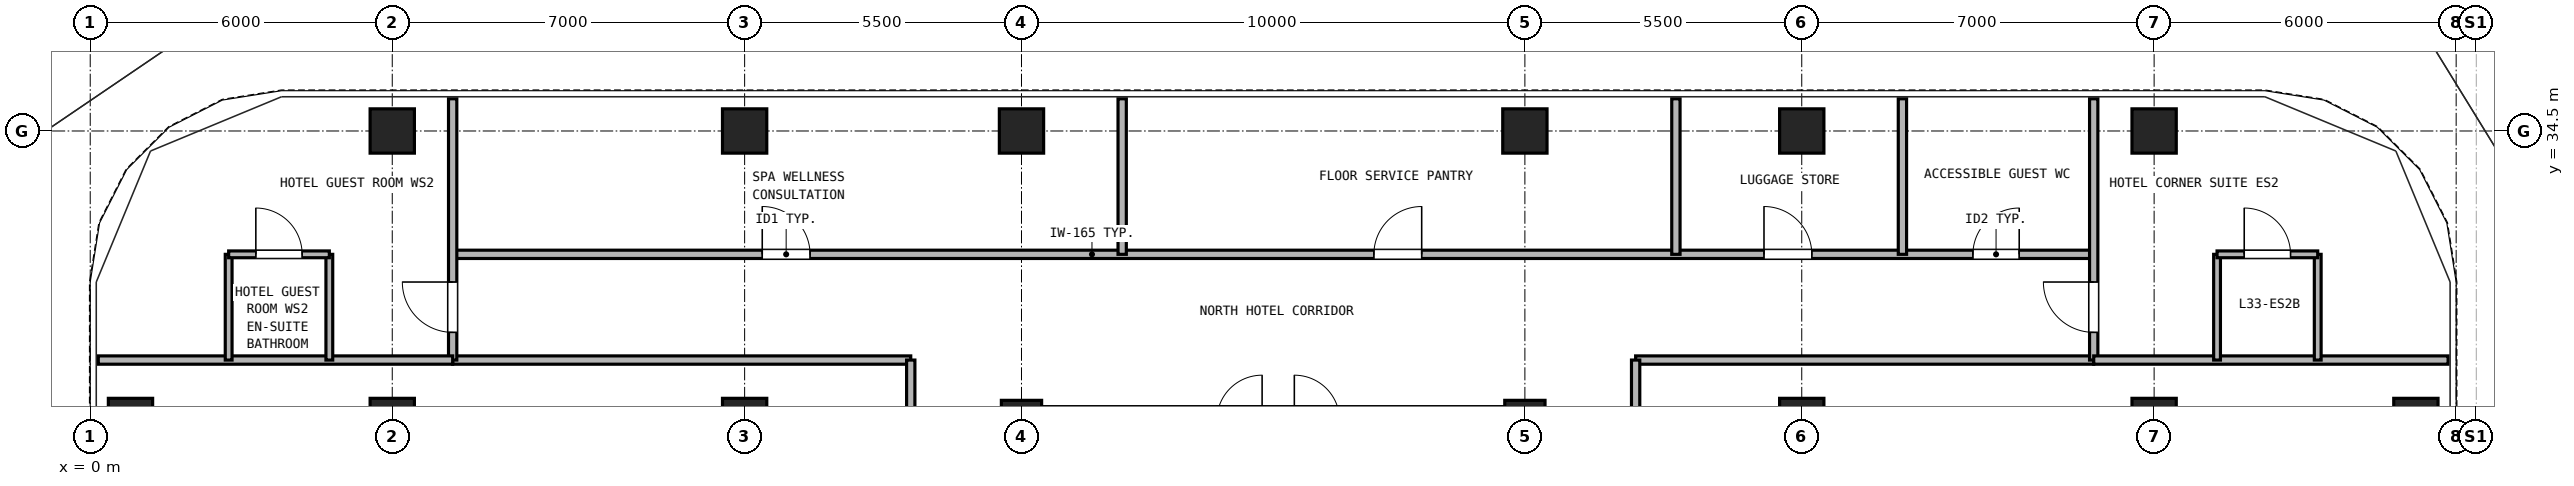
"""IFC4 building model, lengths in metres.
Left out: names, types, materials, properties, quantities, classifications, styles, units other than length and angle.
Written with IfcOpenShell. Run it as: python <this file> out.ifc"""

import sys

from ifc_helpers import new_model, si_unit, direction, frame, frame_2d, origin, origin_2d, place, context, subcontext, project, spatial, rectangle, hollow_rectangle, extrude, source, transform, mapped, element, fill, save


model = new_model("IFC4")
c1 = context("Model", 3, precision=1e-05, world=origin(), true_north=direction((0.0, 1.0)))
c2 = subcontext(c1, "Body", "Model", "MODEL_VIEW")
j1 = project(units=[si_unit("LENGTHUNIT", "METRE"), si_unit("PLANEANGLEUNIT", "RADIAN")], contexts=[c1])
p1 = place(None, origin())
s1 = spatial("IfcSite", under=j1, at=p1, CompositionType="ELEMENT")
p2 = place(p1, origin())
s2 = spatial("IfcBuilding", under=s1, at=p2, CompositionType="ELEMENT")
p3 = place(p2, frame((0.0, 0.0, 121.5)))
s3 = spatial("IfcBuildingStorey", under=s2, at=p3, CompositionType="ELEMENT", Elevation=121.5)
m1 = source(origin(), c2, "Body", "SweptSolid", [
    extrude(hollow_rectangle(XDim=0.88, YDim=0.88, WallThickness=0.05, at=origin_2d()), origin(), (0.0, 0.0, 1.0), 2.95),
])
for number, where, z_axis, x_axis in (
    (1, (6.0, 34.5, 0.0), (0.0, 0.0, 1.0), (1.0, 0.0, 0.0)),
    (2, (13.0, 34.5, 0.0), (0.0, 0.0, 1.0), (1.0, 0.0, 0.0)),
    (3, (18.5, 34.5, 0.0), (0.0, 0.0, 1.0), (1.0, 0.0, 0.0)),
    (4, (28.5, 34.5, 0.0), (0.0, 0.0, 1.0), (1.0, 0.0, 0.0)),
    (5, (34.0, 34.5, 0.0), (0.0, 0.0, 1.0), (1.0, 0.0, 0.0)),
    (6, (41.0, 34.5, 0.0), (0.0, 0.0, 1.0), (1.0, 0.0, 0.0)),
    (7, (0.8, 28.75, 0.0), (0.0, 0.0, 1.0), (1.0, 0.0, 0.0)),
    (8, (46.2, 28.75, 0.0), (0.0, 0.0, 1.0), (1.0, 0.0, 0.0)),
    (9, (6.0, 28.75, 0.0), (0.0, 0.0, 1.0), (1.0, 0.0, 0.0)),
    (10, (13.0, 28.75, 0.0), (0.0, 0.0, 1.0), (1.0, 0.0, 0.0)),
):
    element("IfcColumn", number, at=place(p3, frame(where, z_axis=z_axis, x_axis=x_axis)), inside=s3, PredefinedType="COLUMN", context=c2, shape_type="MappedRepresentation", body=[
        mapped(m1, transform((0.0, 0.0, 0.0), x_axis=(1.0, 0.0, 0.0), y_axis=(0.0, 1.0, 0.0), z_axis=(0.0, 0.0, 1.0), scale=1.0)),
    ])
m2 = source(origin(), c2, "Body", "SweptSolid", [
    extrude(hollow_rectangle(XDim=0.8, YDim=0.8, WallThickness=0.045, at=origin_2d()), origin(), (0.0, 0.0, 1.0), 2.95),
])
for number, where, z_axis, x_axis in (
    (11, (18.5, 28.75, 0.0), (0.0, 0.0, 1.0), (1.0, 0.0, 0.0)),
    (12, (28.5, 28.75, 0.0), (0.0, 0.0, 1.0), (1.0, 0.0, 0.0)),
):
    element("IfcColumn", number, at=place(p3, frame(where, z_axis=z_axis, x_axis=x_axis)), inside=s3, PredefinedType="COLUMN", context=c2, shape_type="MappedRepresentation", body=[
        mapped(m2, transform((0.0, 0.0, 0.0), x_axis=(1.0, 0.0, 0.0), y_axis=(0.0, 1.0, 0.0), z_axis=(0.0, 0.0, 1.0), scale=1.0)),
    ])
for number, where, z_axis, x_axis in (
    (13, (34.0, 28.75, 0.0), (0.0, 0.0, 1.0), (1.0, 0.0, 0.0)),
    (14, (41.0, 28.75, 0.0), (0.0, 0.0, 1.0), (1.0, 0.0, 0.0)),
):
    element("IfcColumn", number, at=place(p3, frame(where, z_axis=z_axis, x_axis=x_axis)), inside=s3, PredefinedType="COLUMN", context=c2, shape_type="MappedRepresentation", body=[
        mapped(m1, transform((0.0, 0.0, 0.0), x_axis=(1.0, 0.0, 0.0), y_axis=(0.0, 1.0, 0.0), z_axis=(0.0, 0.0, 1.0), scale=1.0)),
    ])
p4 = place(p3, frame((7.2, 32.05, 0.0), z_axis=(0.0, 0.0, 1.0), x_axis=(1.0, 0.0, 0.0)))
e15 = element("IfcWall", 15, at=p4, inside=s3, PredefinedType="PARTITIONING", context=c2, shape_type="SweptSolid", body=[
    extrude(rectangle(XDim=32.6, YDim=0.165, at=frame_2d((16.3, 0.0))), origin(), (0.0, 0.0, 1.0), 2.95),
])
p5 = place(p4, frame((6.15, 0.0, 0.0)))
e16 = element("IfcOpeningElement", 16, at=p5, cuts=e15, PredefinedType="OPENING", context=c2, shape_type="SweptSolid", body=[
    extrude(rectangle(XDim=0.95, YDim=2.15, at=frame_2d((0.475, 1.075))), frame((0.0, 0.093, 0.0), z_axis=(0.0, -1.0, 0.0), x_axis=(1.0, 0.0, 0.0)), (0.0, 0.0, 1.0), 0.185),
])
p6 = place(p4, frame((18.3, 0.0, 0.0)))
e17 = element("IfcOpeningElement", 17, at=p6, cuts=e15, PredefinedType="OPENING", context=c2, shape_type="SweptSolid", body=[
    extrude(rectangle(XDim=0.95, YDim=2.15, at=frame_2d((0.475, 1.075))), frame((0.0, 0.093, 0.0), z_axis=(0.0, -1.0, 0.0), x_axis=(1.0, 0.0, 0.0)), (0.0, 0.0, 1.0), 0.185),
])
p7 = place(p4, frame((26.05, 0.0, 0.0)))
e18 = element("IfcOpeningElement", 18, at=p7, cuts=e15, PredefinedType="OPENING", context=c2, shape_type="SweptSolid", body=[
    extrude(rectangle(XDim=0.95, YDim=2.15, at=frame_2d((0.475, 1.075))), frame((0.0, 0.093, 0.0), z_axis=(0.0, -1.0, 0.0), x_axis=(1.0, 0.0, 0.0)), (0.0, 0.0, 1.0), 0.185),
])
p8 = place(p4, frame((30.2, 0.0, 0.0)))
e19 = element("IfcOpeningElement", 19, at=p8, cuts=e15, PredefinedType="OPENING", context=c2, shape_type="SweptSolid", body=[
    extrude(rectangle(XDim=0.92, YDim=2.1, at=frame_2d((0.46, 1.05))), frame((0.0, 0.093, 0.0), z_axis=(0.0, -1.0, 0.0), x_axis=(1.0, 0.0, 0.0)), (0.0, 0.0, 1.0), 0.185),
])
for number, where, z_axis, x_axis in (
    (20, (7.2, 29.95, 0.0), (0.0, 0.0, 1.0), (1.0, 0.0, 0.0)),
    (21, (30.7, 29.95, 0.0), (0.0, 0.0, 1.0), (1.0, 0.0, 0.0)),
):
    element("IfcWall", number, at=place(p3, frame(where, z_axis=z_axis, x_axis=x_axis)), inside=s3, PredefinedType="PARTITIONING", context=c2, shape_type="SweptSolid", body=[
        extrude(rectangle(XDim=9.1, YDim=0.165, at=frame_2d((4.55, 0.0))), origin(), (0.0, 0.0, 1.0), 2.95),
    ])
p9 = place(p3, frame((16.3, 11.2, 0.0), z_axis=(0.0, 0.0, 1.0), x_axis=(0.0, 1.0, 0.0)))
e22 = element("IfcWall", 22, at=p9, inside=s3, PredefinedType="PARTITIONING", context=c2, shape_type="SweptSolid", body=[
    extrude(rectangle(XDim=18.75, YDim=0.165, at=frame_2d((9.375, 0.0))), origin(), (0.0, 0.0, 1.0), 2.95),
])
p10 = place(p9, frame((8.875, 0.0, 0.0)))
e23 = element("IfcOpeningElement", 23, at=p10, cuts=e22, PredefinedType="OPENING", context=c2, shape_type="SweptSolid", body=[
    extrude(rectangle(XDim=0.95, YDim=2.15, at=frame_2d((0.475, 1.075))), frame((0.0, 0.093, 0.0), z_axis=(0.0, -1.0, 0.0), x_axis=(1.0, 0.0, 0.0)), (0.0, 0.0, 1.0), 0.185),
])
p11 = place(p3, frame((30.7, 11.2, 0.0), z_axis=(0.0, 0.0, 1.0), x_axis=(0.0, 1.0, 0.0)))
e24 = element("IfcWall", 24, at=p11, inside=s3, PredefinedType="PARTITIONING", context=c2, shape_type="SweptSolid", body=[
    extrude(rectangle(XDim=18.75, YDim=0.165, at=frame_2d((9.375, 0.0))), origin(), (0.0, 0.0, 1.0), 2.95),
])
p12 = place(p11, frame((2.6, 0.0, 0.0)))
e25 = element("IfcOpeningElement", 25, at=p12, cuts=e24, PredefinedType="OPENING", context=c2, shape_type="SweptSolid", body=[
    extrude(rectangle(XDim=0.95, YDim=2.15, at=frame_2d((0.475, 1.075))), frame((0.0, 0.093, 0.0), z_axis=(0.0, -1.0, 0.0), x_axis=(1.0, 0.0, 0.0)), (0.0, 0.0, 1.0), 0.185),
])
p13 = place(p11, frame((8.8, 0.0, 0.0)))
e26 = element("IfcOpeningElement", 26, at=p13, cuts=e24, PredefinedType="OPENING", context=c2, shape_type="SweptSolid", body=[
    extrude(rectangle(XDim=0.95, YDim=2.15, at=frame_2d((0.475, 1.075))), frame((0.0, 0.093, 0.0), z_axis=(0.0, -1.0, 0.0), x_axis=(1.0, 0.0, 0.0)), (0.0, 0.0, 1.0), 0.185),
])
p14 = place(p11, frame((15.075, 0.0, 0.0)))
e27 = element("IfcOpeningElement", 27, at=p14, cuts=e24, PredefinedType="OPENING", context=c2, shape_type="SweptSolid", body=[
    extrude(rectangle(XDim=0.95, YDim=2.15, at=frame_2d((0.475, 1.075))), frame((0.0, 0.093, 0.0), z_axis=(0.0, -1.0, 0.0), x_axis=(1.0, 0.0, 0.0)), (0.0, 0.0, 1.0), 0.185),
])
p15 = place(p3, frame((7.2, 29.95, 0.0), z_axis=(0.0, 0.0, 1.0), x_axis=(0.0, 1.0, 0.0)))
e28 = element("IfcWall", 28, at=p15, inside=s3, PredefinedType="PARTITIONING", context=c2, shape_type="SweptSolid", body=[
    extrude(rectangle(XDim=5.19, YDim=0.165, at=frame_2d((2.595, 0.0))), origin(), (0.0, 0.0, 1.0), 2.95),
])
p16 = place(p15, frame((0.55, 0.0, 0.0)))
e29 = element("IfcOpeningElement", 29, at=p16, cuts=e28, PredefinedType="OPENING", context=c2, shape_type="SweptSolid", body=[
    extrude(rectangle(XDim=1.0, YDim=2.15, at=frame_2d((0.5, 1.075))), frame((0.0, 0.093, 0.0), z_axis=(0.0, -1.0, 0.0), x_axis=(1.0, 0.0, 0.0)), (0.0, 0.0, 1.0), 0.185),
])
p17 = place(p3, frame((39.8, 29.95, 0.0), z_axis=(0.0, 0.0, 1.0), x_axis=(0.0, 1.0, 0.0)))
e30 = element("IfcWall", 30, at=p17, inside=s3, PredefinedType="PARTITIONING", context=c2, shape_type="SweptSolid", body=[
    extrude(rectangle(XDim=5.19, YDim=0.165, at=frame_2d((2.595, 0.0))), origin(), (0.0, 0.0, 1.0), 2.95),
])
p18 = place(p17, frame((0.55, 0.0, 0.0)))
e31 = element("IfcOpeningElement", 31, at=p18, cuts=e30, PredefinedType="OPENING", context=c2, shape_type="SweptSolid", body=[
    extrude(rectangle(XDim=1.0, YDim=2.15, at=frame_2d((0.5, 1.075))), frame((0.0, 0.093, 0.0), z_axis=(0.0, -1.0, 0.0), x_axis=(1.0, 0.0, 0.0)), (0.0, 0.0, 1.0), 0.185),
])
for number, where, z_axis, x_axis in (
    (32, (0.16, 29.95, 0.0), (0.0, 0.0, 1.0), (1.0, 0.0, 0.0)),
    (33, (39.8, 29.95, 0.0), (0.0, 0.0, 1.0), (1.0, 0.0, 0.0)),
):
    element("IfcWall", number, at=place(p3, frame(where, z_axis=z_axis, x_axis=x_axis)), inside=s3, PredefinedType="PARTITIONING", context=c2, shape_type="SweptSolid", body=[
        extrude(rectangle(XDim=7.04, YDim=0.165, at=frame_2d((3.52, 0.0))), origin(), (0.0, 0.0, 1.0), 2.95),
    ])
for number, where, z_axis, x_axis in (
    (34, (2.75, 29.95, 0.0), (0.0, 0.0, 1.0), (0.0, 1.0, 0.0)),
    (35, (4.75, 29.95, 0.0), (0.0, 0.0, 1.0), (0.0, 1.0, 0.0)),
):
    element("IfcWall", number, at=place(p3, frame(where, z_axis=z_axis, x_axis=x_axis)), inside=s3, PredefinedType="PARTITIONING", context=c2, shape_type="SweptSolid", body=[
        extrude(rectangle(XDim=2.1, YDim=0.135, at=frame_2d((1.05, 0.0))), origin(), (0.0, 0.0, 1.0), 2.95),
    ])
p19 = place(p3, frame((2.75, 32.05, 0.0), z_axis=(0.0, 0.0, 1.0), x_axis=(1.0, 0.0, 0.0)))
e36 = element("IfcWall", 36, at=p19, inside=s3, PredefinedType="PARTITIONING", context=c2, shape_type="SweptSolid", body=[
    extrude(rectangle(XDim=2.0, YDim=0.135, at=frame_2d((1.0, 0.0))), origin(), (0.0, 0.0, 1.0), 2.95),
])
p20 = place(p19, frame((0.54, 0.0, 0.0)))
e37 = element("IfcOpeningElement", 37, at=p20, cuts=e36, PredefinedType="OPENING", context=c2, shape_type="SweptSolid", body=[
    extrude(rectangle(XDim=0.92, YDim=2.1, at=frame_2d((0.46, 1.05))), frame((0.0, 0.077, 0.0), z_axis=(0.0, -1.0, 0.0), x_axis=(1.0, 0.0, 0.0)), (0.0, 0.0, 1.0), 0.155),
])
for number, where, z_axis, x_axis in (
    (38, (42.25, 29.95, 0.0), (0.0, 0.0, 1.0), (0.0, 1.0, 0.0)),
    (39, (44.25, 29.95, 0.0), (0.0, 0.0, 1.0), (0.0, 1.0, 0.0)),
):
    element("IfcWall", number, at=place(p3, frame(where, z_axis=z_axis, x_axis=x_axis)), inside=s3, PredefinedType="PARTITIONING", context=c2, shape_type="SweptSolid", body=[
        extrude(rectangle(XDim=2.1, YDim=0.135, at=frame_2d((1.05, 0.0))), origin(), (0.0, 0.0, 1.0), 2.95),
    ])
p21 = place(p3, frame((42.25, 32.05, 0.0), z_axis=(0.0, 0.0, 1.0), x_axis=(1.0, 0.0, 0.0)))
e40 = element("IfcWall", 40, at=p21, inside=s3, PredefinedType="PARTITIONING", context=c2, shape_type="SweptSolid", body=[
    extrude(rectangle(XDim=2.0, YDim=0.135, at=frame_2d((1.0, 0.0))), origin(), (0.0, 0.0, 1.0), 2.95),
])
p22 = place(p21, frame((0.54, 0.0, 0.0)))
e41 = element("IfcOpeningElement", 41, at=p22, cuts=e40, PredefinedType="OPENING", context=c2, shape_type="SweptSolid", body=[
    extrude(rectangle(XDim=0.92, YDim=2.1, at=frame_2d((0.46, 1.05))), frame((0.0, 0.077, 0.0), z_axis=(0.0, -1.0, 0.0), x_axis=(1.0, 0.0, 0.0)), (0.0, 0.0, 1.0), 0.155),
])
for number, where, z_axis, x_axis in (
    (42, (20.5, 32.05, 0.0), (0.0, 0.0, 1.0), (0.0, 1.0, 0.0)),
    (43, (31.5, 32.05, 0.0), (0.0, 0.0, 1.0), (0.0, 1.0, 0.0)),
    (44, (36.0, 32.05, 0.0), (0.0, 0.0, 1.0), (0.0, 1.0, 0.0)),
):
    element("IfcWall", number, at=place(p3, frame(where, z_axis=z_axis, x_axis=x_axis)), inside=s3, PredefinedType="PARTITIONING", context=c2, shape_type="SweptSolid", body=[
        extrude(rectangle(XDim=3.09, YDim=0.165, at=frame_2d((1.545, 0.0))), origin(), (0.0, 0.0, 1.0), 2.95),
    ])
p23 = place(p20, frame((0.92, 0.0, 0.0), z_axis=(0.0, 0.0, 1.0), x_axis=(-1.0, 0.0, 0.0)))
e45 = element("IfcDoor", 45, at=p23, inside=s3, OperationType="SINGLE_SWING_LEFT", PredefinedType="DOOR", context=c2, shape_type="SweptSolid", body=[
    extrude(rectangle(XDim=0.92, YDim=2.1, at=frame_2d((0.46, 1.05))), frame((0.0, 0.025, 0.0), z_axis=(0.0, -1.0, 0.0), x_axis=(1.0, 0.0, 0.0)), (0.0, 0.0, 1.0), 0.05),
])
fill(e37, e45)
p24 = place(p16, origin())
e46 = element("IfcDoor", 46, at=p24, inside=s3, OperationType="SINGLE_SWING_RIGHT", PredefinedType="DOOR", context=c2, shape_type="SweptSolid", body=[
    extrude(rectangle(XDim=1.0, YDim=2.15, at=frame_2d((0.5, 1.075))), frame((0.0, 0.025, 0.0), z_axis=(0.0, -1.0, 0.0), x_axis=(1.0, 0.0, 0.0)), (0.0, 0.0, 1.0), 0.05),
])
fill(e29, e46)
p25 = place(p22, frame((0.92, 0.0, 0.0), z_axis=(0.0, 0.0, 1.0), x_axis=(-1.0, 0.0, 0.0)))
e47 = element("IfcDoor", 47, at=p25, inside=s3, OperationType="SINGLE_SWING_LEFT", PredefinedType="DOOR", context=c2, shape_type="SweptSolid", body=[
    extrude(rectangle(XDim=0.92, YDim=2.1, at=frame_2d((0.46, 1.05))), frame((0.0, 0.025, 0.0), z_axis=(0.0, -1.0, 0.0), x_axis=(1.0, 0.0, 0.0)), (0.0, 0.0, 1.0), 0.05),
])
fill(e41, e47)
p26 = place(p18, frame((1.0, 0.0, 0.0), z_axis=(0.0, 0.0, 1.0), x_axis=(-1.0, 0.0, 0.0)))
e48 = element("IfcDoor", 48, at=p26, inside=s3, OperationType="SINGLE_SWING_RIGHT", PredefinedType="DOOR", context=c2, shape_type="SweptSolid", body=[
    extrude(rectangle(XDim=1.0, YDim=2.15, at=frame_2d((0.5, 1.075))), frame((0.0, 0.025, 0.0), z_axis=(0.0, -1.0, 0.0), x_axis=(1.0, 0.0, 0.0)), (0.0, 0.0, 1.0), 0.05),
])
fill(e31, e48)
p27 = place(p5, origin())
e49 = element("IfcDoor", 49, at=p27, inside=s3, OperationType="SINGLE_SWING_LEFT", PredefinedType="DOOR", context=c2, shape_type="SweptSolid", body=[
    extrude(rectangle(XDim=0.95, YDim=2.15, at=frame_2d((0.475, 1.075))), frame((0.0, 0.025, 0.0), z_axis=(0.0, -1.0, 0.0), x_axis=(1.0, 0.0, 0.0)), (0.0, 0.0, 1.0), 0.05),
])
fill(e16, e49)
p28 = place(p6, origin())
e50 = element("IfcDoor", 50, at=p28, inside=s3, OperationType="SINGLE_SWING_RIGHT", PredefinedType="DOOR", context=c2, shape_type="SweptSolid", body=[
    extrude(rectangle(XDim=0.95, YDim=2.15, at=frame_2d((0.475, 1.075))), frame((0.0, 0.025, 0.0), z_axis=(0.0, -1.0, 0.0), x_axis=(1.0, 0.0, 0.0)), (0.0, 0.0, 1.0), 0.05),
])
fill(e17, e50)
p29 = place(p7, origin())
e51 = element("IfcDoor", 51, at=p29, inside=s3, OperationType="SINGLE_SWING_LEFT", PredefinedType="DOOR", context=c2, shape_type="SweptSolid", body=[
    extrude(rectangle(XDim=0.95, YDim=2.15, at=frame_2d((0.475, 1.075))), frame((0.0, 0.025, 0.0), z_axis=(0.0, -1.0, 0.0), x_axis=(1.0, 0.0, 0.0)), (0.0, 0.0, 1.0), 0.05),
])
fill(e18, e51)
p30 = place(p8, origin())
e52 = element("IfcDoor", 52, at=p30, inside=s3, OperationType="SINGLE_SWING_RIGHT", PredefinedType="DOOR", context=c2, shape_type="SweptSolid", body=[
    extrude(rectangle(XDim=0.92, YDim=2.1, at=frame_2d((0.46, 1.05))), frame((0.0, 0.025, 0.0), z_axis=(0.0, -1.0, 0.0), x_axis=(1.0, 0.0, 0.0)), (0.0, 0.0, 1.0), 0.05),
])
fill(e19, e52)
save(model, sys.argv[1])
